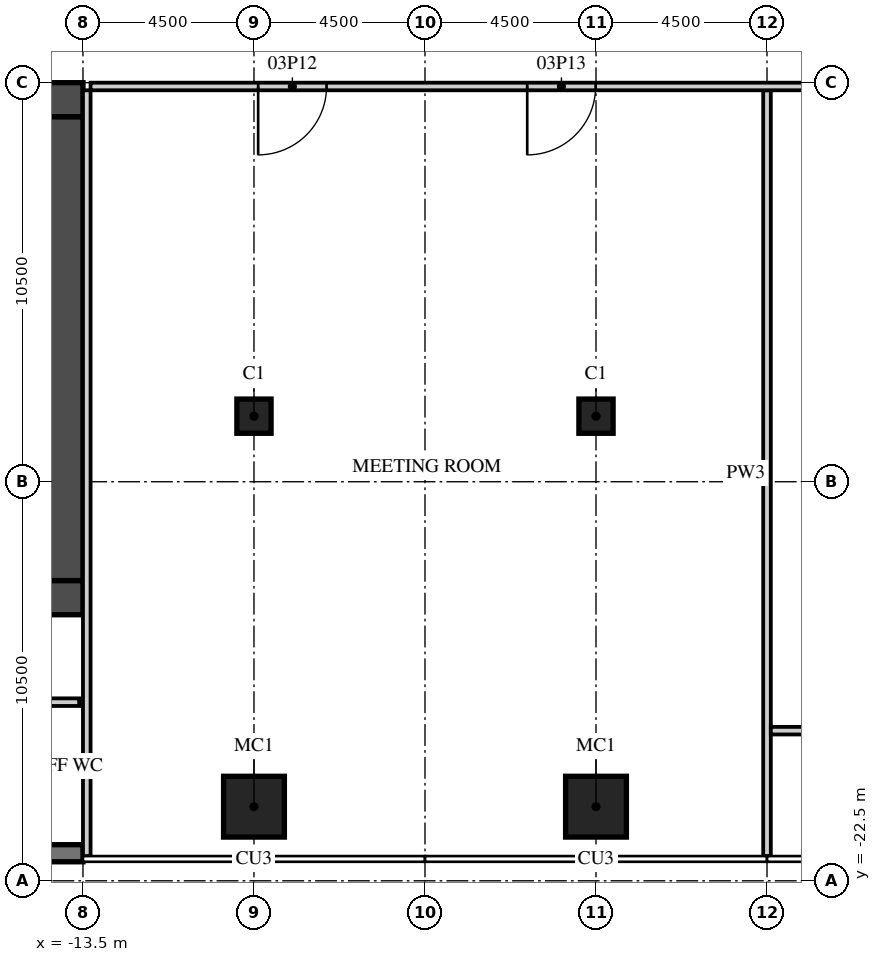
"""IFC4 building model, lengths in metres.
Left out: names, types, materials, properties, quantities, classifications, styles, units other than length and angle.
Written with IfcOpenShell. Run it as: python <this file> out.ifc"""

import sys

from ifc_helpers import new_model, si_unit, direction, frame, frame_2d, origin, origin_2d, place, context, subcontext, project, spatial, rectangle, extrude, element, fill, save


model = new_model("IFC4")
c1 = context("Model", 3, precision=1e-05, world=origin(), true_north=direction((0.0, 1.0)))
c2 = subcontext(c1, "Body", "Model", "MODEL_VIEW")
j1 = project(units=[si_unit("LENGTHUNIT", "METRE"), si_unit("PLANEANGLEUNIT", "RADIAN")], contexts=[c1])
p1 = place(None, origin())
s1 = spatial("IfcSite", under=j1, at=p1, CompositionType="ELEMENT")
p2 = place(p1, origin())
s2 = spatial("IfcBuilding", under=s1, at=p2, CompositionType="ELEMENT")
p3 = place(p2, frame((0.0, 0.0, 23.5)))
s3 = spatial("IfcBuildingStorey", under=s2, at=p3, CompositionType="ELEMENT", Elevation=23.5)
for number, where, z_axis, x_axis in (
    (1, (-9.0, -20.55, 0.0), (0.0, 0.0, 1.0), (1.0, 0.0, 0.0)),
    (2, (0.0, -20.55, 0.0), (0.0, 0.0, 1.0), (1.0, 0.0, 0.0)),
):
    element("IfcColumn", number, at=place(p3, frame(where, z_axis=z_axis, x_axis=x_axis)), inside=s3, PredefinedType="COLUMN", context=c2, shape_type="SweptSolid", body=[
        extrude(rectangle(XDim=1.6, YDim=1.6, at=origin_2d()), origin(), (0.0, 0.0, 1.0), 5.5),
    ])
for number, where, z_axis, x_axis in (
    (3, (-9.0, -10.275, 0.0), (0.0, 0.0, 1.0), (1.0, 0.0, 0.0)),
    (4, (0.0, -10.275, 0.0), (0.0, 0.0, 1.0), (1.0, 0.0, 0.0)),
):
    element("IfcColumn", number, at=place(p3, frame(where, z_axis=z_axis, x_axis=x_axis)), inside=s3, PredefinedType="COLUMN", context=c2, shape_type="SweptSolid", body=[
        extrude(rectangle(XDim=0.9, YDim=0.9, at=origin_2d()), origin(), (0.0, 0.0, 1.0), 5.5),
    ])
p4 = place(p3, frame((-31.5, -21.775, 0.0), z_axis=(0.0, 0.0, 1.0), x_axis=(1.0, 0.0, 0.0)))
e5 = element("IfcWall", 5, at=p4, inside=s3, PredefinedType="SOLIDWALL", context=c2, shape_type="SweptSolid", body=[
    extrude(rectangle(XDim=18.0, YDim=0.45, at=frame_2d((9.0, 0.0))), origin(), (0.0, 0.0, 1.0), 5.05),
])
p5 = place(p3, frame((-31.5, -1.95, 0.0), z_axis=(0.0, 0.0, 1.0), x_axis=(1.0, 0.0, 0.0)))
e6 = element("IfcWall", 6, at=p5, inside=s3, PredefinedType="SHEAR", context=c2, shape_type="SweptSolid", body=[
    extrude(rectangle(XDim=18.0, YDim=0.9, at=frame_2d((9.0, 0.0))), origin(), (0.0, 0.0, 1.0), 5.05),
])
p6 = place(p5, frame((14.725, 0.0, 0.0)))
e7 = element("IfcOpeningElement", 7, at=p6, cuts=e6, PredefinedType="OPENING", context=c2, shape_type="SweptSolid", body=[
    extrude(rectangle(XDim=1.8, YDim=2.1, at=frame_2d((0.9, 1.05))), frame((0.0, 0.46, 0.0), z_axis=(0.0, -1.0, 0.0), x_axis=(1.0, 0.0, 0.0)), (0.0, 0.0, 1.0), 0.92),
])
p7 = place(p3, frame((-20.3, -15.05, 0.0), z_axis=(0.0, 0.0, 1.0), x_axis=(1.0, 0.0, 0.0)))
e8 = element("IfcWall", 8, at=p7, inside=s3, PredefinedType="SHEAR", context=c2, shape_type="SweptSolid", body=[
    extrude(rectangle(XDim=6.8, YDim=0.9, at=frame_2d((3.4, 0.0))), origin(), (0.0, 0.0, 1.0), 5.05),
])
p8 = place(p7, frame((0.875, 0.0, 0.0)))
e9 = element("IfcOpeningElement", 9, at=p8, cuts=e8, PredefinedType="OPENING", context=c2, shape_type="SweptSolid", body=[
    extrude(rectangle(XDim=1.2, YDim=2.1, at=frame_2d((0.6, 1.05))), frame((0.0, 0.46, 0.0), z_axis=(0.0, -1.0, 0.0), x_axis=(1.0, 0.0, 0.0)), (0.0, 0.0, 1.0), 0.92),
])
p9 = place(p3, frame((-13.95, -14.6, 0.0), z_axis=(0.0, 0.0, 1.0), x_axis=(0.0, 1.0, 0.0)))
e10 = element("IfcWall", 10, at=p9, inside=s3, PredefinedType="SHEAR", context=c2, shape_type="SweptSolid", body=[
    extrude(rectangle(XDim=12.2, YDim=0.9, at=frame_2d((6.1, 0.0))), origin(), (0.0, 0.0, 1.0), 5.05),
])
p10 = place(p3, frame((-44.55, -17.8, 0.0), z_axis=(0.0, 0.0, 1.0), x_axis=(1.0, 0.0, 0.0)))
e11 = element("IfcWall", 11, at=p10, inside=s3, PredefinedType="PARTITIONING", context=c2, shape_type="SweptSolid", body=[
    extrude(rectangle(XDim=30.95, YDim=0.2, at=frame_2d((15.475, 0.0))), origin(), (0.0, 0.0, 1.0), 5.05),
])
p11 = place(p10, frame((15.038, 0.0, 0.0)))
e12 = element("IfcOpeningElement", 12, at=p11, cuts=e11, PredefinedType="OPENING", context=c2, shape_type="SweptSolid", body=[
    extrude(rectangle(XDim=0.9, YDim=2.1, at=frame_2d((0.45, 1.05))), frame((0.0, 0.11, 0.0), z_axis=(0.0, -1.0, 0.0), x_axis=(1.0, 0.0, 0.0)), (0.0, 0.0, 1.0), 0.22),
])
p12 = place(p10, frame((23.337, 0.0, 0.0)))
e13 = element("IfcOpeningElement", 13, at=p12, cuts=e11, PredefinedType="OPENING", context=c2, shape_type="SweptSolid", body=[
    extrude(rectangle(XDim=0.9, YDim=2.1, at=frame_2d((0.45, 1.05))), frame((0.0, 0.11, 0.0), z_axis=(0.0, -1.0, 0.0), x_axis=(1.0, 0.0, 0.0)), (0.0, 0.0, 1.0), 0.22),
])
p13 = place(p3, frame((4.5, -21.85, 0.0), z_axis=(0.0, 0.0, 1.0), x_axis=(0.0, 1.0, 0.0)))
e14 = element("IfcWall", 14, at=p13, inside=s3, PredefinedType="PARTITIONING", context=c2, shape_type="SweptSolid", body=[
    extrude(rectangle(XDim=20.15, YDim=0.2, at=frame_2d((10.075, 0.0))), origin(), (0.0, 0.0, 1.0), 5.05),
])
p14 = place(p3, frame((4.6, -18.55, 0.0), z_axis=(0.0, 0.0, 1.0), x_axis=(1.0, 0.0, 0.0)))
e15 = element("IfcWall", 15, at=p14, inside=s3, PredefinedType="PARTITIONING", context=c2, shape_type="SweptSolid", body=[
    extrude(rectangle(XDim=8.8, YDim=0.2, at=frame_2d((4.4, 0.0))), origin(), (0.0, 0.0, 1.0), 5.05),
])
p15 = place(p14, frame((1.375, 0.0, 0.0)))
e16 = element("IfcOpeningElement", 16, at=p15, cuts=e15, PredefinedType="OPENING", context=c2, shape_type="SweptSolid", body=[
    extrude(rectangle(XDim=0.9, YDim=2.1, at=frame_2d((0.45, 1.05))), frame((0.0, 0.11, 0.0), z_axis=(0.0, -1.0, 0.0), x_axis=(1.0, 0.0, 0.0)), (0.0, 0.0, 1.0), 0.22),
])
p16 = place(p3, frame((-13.3, -1.6, 0.0), z_axis=(0.0, 0.0, 1.0), x_axis=(1.0, 0.0, 0.0)))
e17 = element("IfcWall", 17, at=p16, inside=s3, PredefinedType="PARTITIONING", context=c2, shape_type="SweptSolid", body=[
    extrude(rectangle(XDim=52.7, YDim=0.2, at=frame_2d((26.35, 0.0))), origin(), (0.0, 0.0, 1.0), 5.05),
])
p17 = place(p16, frame((4.41, 0.0, 0.0)))
e18 = element("IfcOpeningElement", 18, at=p17, cuts=e17, PredefinedType="OPENING", context=c2, shape_type="SweptSolid", body=[
    extrude(rectangle(XDim=1.8, YDim=2.1, at=frame_2d((0.9, 1.05))), frame((0.0, 0.11, 0.0), z_axis=(0.0, -1.0, 0.0), x_axis=(1.0, 0.0, 0.0)), (0.0, 0.0, 1.0), 0.22),
])
p18 = place(p16, frame((11.49, 0.0, 0.0)))
e19 = element("IfcOpeningElement", 19, at=p18, cuts=e17, PredefinedType="OPENING", context=c2, shape_type="SweptSolid", body=[
    extrude(rectangle(XDim=1.8, YDim=2.1, at=frame_2d((0.9, 1.05))), frame((0.0, 0.11, 0.0), z_axis=(0.0, -1.0, 0.0), x_axis=(1.0, 0.0, 0.0)), (0.0, 0.0, 1.0), 0.22),
])
p19 = place(p16, frame((19.125, 0.0, 0.0)))
e20 = element("IfcOpeningElement", 20, at=p19, cuts=e17, PredefinedType="OPENING", context=c2, shape_type="SweptSolid", body=[
    extrude(rectangle(XDim=1.2, YDim=2.1, at=frame_2d((0.6, 1.05))), frame((0.0, 0.11, 0.0), z_axis=(0.0, -1.0, 0.0), x_axis=(1.0, 0.0, 0.0)), (0.0, 0.0, 1.0), 0.22),
])
p20 = place(p16, frame((30.4, 0.0, 0.0)))
e21 = element("IfcOpeningElement", 21, at=p20, cuts=e17, PredefinedType="OPENING", context=c2, shape_type="SweptSolid", body=[
    extrude(rectangle(XDim=1.8, YDim=2.1, at=frame_2d((0.9, 1.05))), frame((0.0, 0.11, 0.0), z_axis=(0.0, -1.0, 0.0), x_axis=(1.0, 0.0, 0.0)), (0.0, 0.0, 1.0), 0.22),
])
p21 = place(p16, frame((39.8, 0.0, 0.0)))
e22 = element("IfcOpeningElement", 22, at=p21, cuts=e17, PredefinedType="OPENING", context=c2, shape_type="SweptSolid", body=[
    extrude(rectangle(XDim=1.0, YDim=2.1, at=frame_2d((0.5, 1.05))), frame((0.0, 0.11, 0.0), z_axis=(0.0, -1.0, 0.0), x_axis=(1.0, 0.0, 0.0)), (0.0, 0.0, 1.0), 0.22),
])
p22 = place(p16, frame((46.2, 0.0, 0.0)))
e23 = element("IfcOpeningElement", 23, at=p22, cuts=e17, PredefinedType="OPENING", context=c2, shape_type="SweptSolid", body=[
    extrude(rectangle(XDim=1.8, YDim=2.1, at=frame_2d((0.9, 1.05))), frame((0.0, 0.11, 0.0), z_axis=(0.0, -1.0, 0.0), x_axis=(1.0, 0.0, 0.0)), (0.0, 0.0, 1.0), 0.22),
])
p23 = place(p16, frame((49.6, 0.0, 0.0)))
e24 = element("IfcOpeningElement", 24, at=p23, cuts=e17, PredefinedType="OPENING", context=c2, shape_type="SweptSolid", body=[
    extrude(rectangle(XDim=1.8, YDim=2.1, at=frame_2d((0.9, 1.05))), frame((0.0, 0.11, 0.0), z_axis=(0.0, -1.0, 0.0), x_axis=(1.0, 0.0, 0.0)), (0.0, 0.0, 1.0), 0.22),
])
p24 = place(p3, frame((-13.4, -21.85, 0.0), z_axis=(0.0, 0.0, 1.0), x_axis=(0.0, 1.0, 0.0)))
e25 = element("IfcWall", 25, at=p24, inside=s3, PredefinedType="PARTITIONING", context=c2, shape_type="SweptSolid", body=[
    extrude(rectangle(XDim=20.15, YDim=0.2, at=frame_2d((10.075, 0.0))), origin(), (0.0, 0.0, 1.0), 5.05),
])
p25 = place(p17, origin())
e26 = element("IfcDoor", 26, at=p25, inside=s3, OperationType="DOUBLE_DOOR_DOUBLE_SWING", PredefinedType="DOOR", context=c2, shape_type="SweptSolid", body=[
    extrude(rectangle(XDim=1.8, YDim=2.1, at=frame_2d((0.9, 1.05))), frame((0.0, 0.025, 0.0), z_axis=(0.0, -1.0, 0.0), x_axis=(1.0, 0.0, 0.0)), (0.0, 0.0, 1.0), 0.05),
])
fill(e18, e26)
p26 = place(p18, origin())
e27 = element("IfcDoor", 27, at=p26, inside=s3, OperationType="DOUBLE_DOOR_DOUBLE_SWING", PredefinedType="DOOR", context=c2, shape_type="SweptSolid", body=[
    extrude(rectangle(XDim=1.8, YDim=2.1, at=frame_2d((0.9, 1.05))), frame((0.0, 0.025, 0.0), z_axis=(0.0, -1.0, 0.0), x_axis=(1.0, 0.0, 0.0)), (0.0, 0.0, 1.0), 0.05),
])
fill(e19, e27)
save(model, sys.argv[1])
